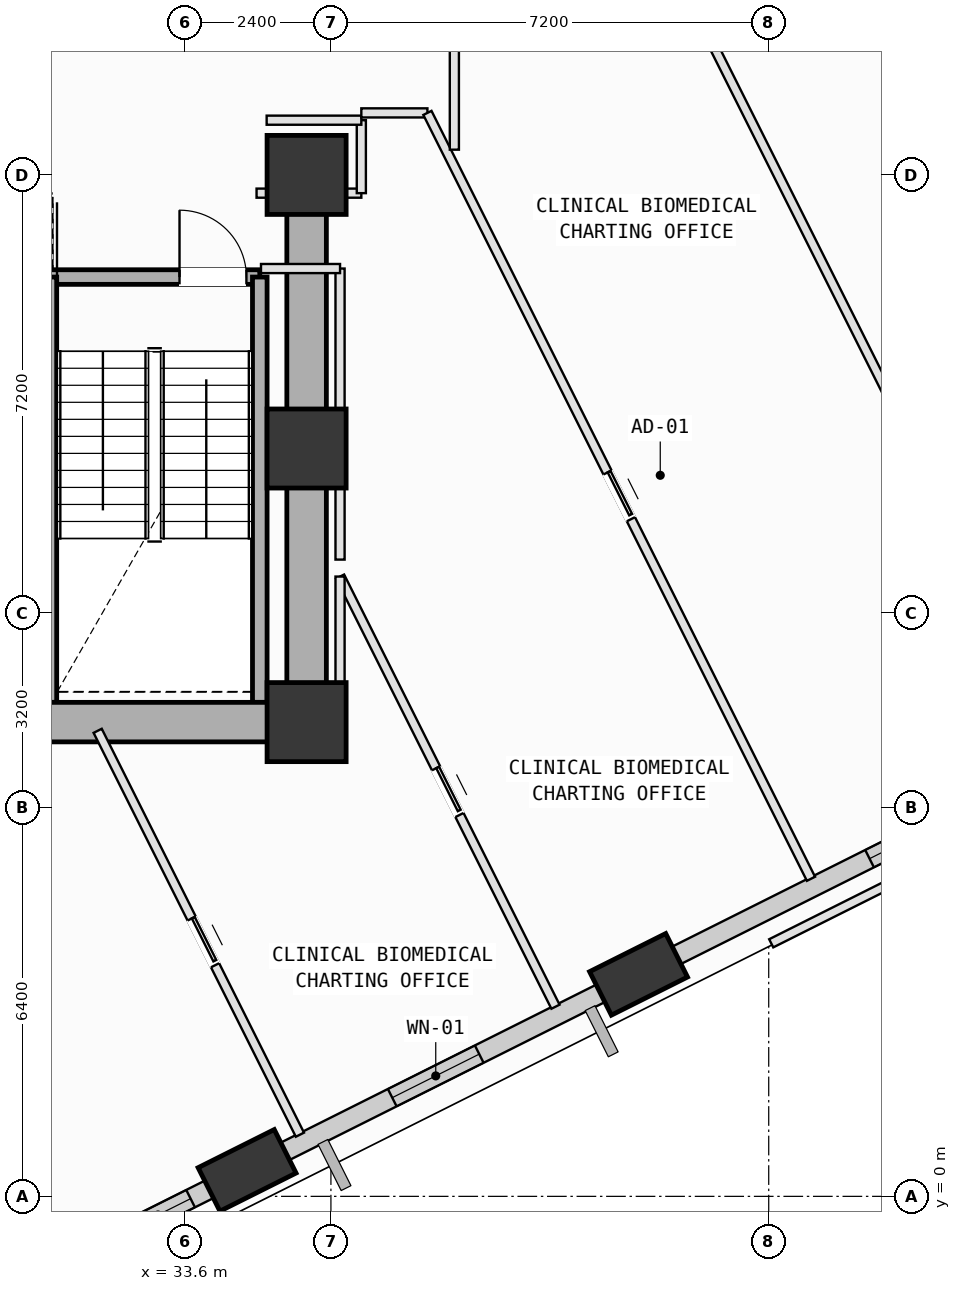
"""IFC4 building model, lengths in metres.
Left out: names, types, materials, properties, quantities, classifications, styles, units other than length and angle.
Written with IfcOpenShell. Run it as: python <this file> out.ifc"""

import sys

from ifc_helpers import new_model, si_unit, direction, frame, frame_2d, origin, origin_2d, place, context, subcontext, project, spatial, rectangle, extrude, element, fill, save


model = new_model("IFC4")
c1 = context("Model", 3, precision=1e-05, world=origin(), true_north=direction((0.0, 1.0)))
c2 = subcontext(c1, "Body", "Model", "MODEL_VIEW")
j1 = project(units=[si_unit("LENGTHUNIT", "METRE"), si_unit("PLANEANGLEUNIT", "RADIAN")], contexts=[c1])
p1 = place(None, origin())
s1 = spatial("IfcSite", under=j1, at=p1, CompositionType="ELEMENT")
p2 = place(p1, origin())
s2 = spatial("IfcBuilding", under=s1, at=p2, CompositionType="ELEMENT")
p3 = place(p2, frame((0.0, 0.0, 136.4)))
s3 = spatial("IfcBuildingStorey", under=s2, at=p3, CompositionType="ELEMENT", Elevation=136.4)
for number, where, z_axis, x_axis in (
    (1, (35.6, 7.8, 0.0), (0.0, 0.0, 1.0), (1.0, 0.0, 0.0)),
    (2, (35.6, 12.3, 0.0), (0.0, 0.0, 1.0), (1.0, 0.0, 0.0)),
    (3, (35.6, 16.8, 0.0), (0.0, 0.0, 1.0), (1.0, 0.0, 0.0)),
):
    element("IfcColumn", number, at=place(p3, frame(where, z_axis=z_axis, x_axis=x_axis)), inside=s3, PredefinedType="COLUMN", context=c2, shape_type="SweptSolid", body=[
        extrude(rectangle(XDim=1.3, YDim=1.3, at=origin_2d()), origin(), (0.0, 0.0, 1.0), 4.0),
    ])
p4 = place(p3, frame((34.621, 0.427, 0.002), z_axis=(0.100471293785, 0.005044838103, 0.994927167552), x_axis=(-0.489767700686, 0.870688619745, 0.045043610104)))
e4 = element("IfcColumn", 4, at=p4, inside=s3, PredefinedType="COLUMN", context=c2, shape_type="SweptSolid", body=[
    extrude(rectangle(XDim=1.4, YDim=0.8, at=origin_2d()), origin(), (0.0, 0.0, 1.0), 4.017),
])
p5 = place(p3, frame((41.059, 3.651, 0.002), z_axis=(0.087045946082, 0.031509294249, 0.995705864021), x_axis=(-0.7235601559, 0.68901563881, 0.041450576223)))
e5 = element("IfcColumn", 5, at=p5, inside=s3, PredefinedType="COLUMN", context=c2, shape_type="SweptSolid", body=[
    extrude(rectangle(XDim=1.4, YDim=0.8, at=origin_2d()), origin(), (0.0, 0.0, 1.0), 4.014),
])
p6 = place(p3, frame((34.349, 0.291, 0.0), z_axis=(0.0, 0.0, 1.0), x_axis=(-0.89414504737, -0.447777438316, 0.0)))
e6 = element("IfcWall", 6, at=p6, inside=s3, PredefinedType="SOLIDWALL", context=c2, shape_type="SweptSolid", body=[
    extrude(rectangle(XDim=6.234, YDim=0.32, at=frame_2d((3.117, 0.0))), origin(), (0.0, 0.0, 1.0), 3.165),
])
p7 = place(p6, frame((0.734, 0.0, 0.75)))
e7 = element("IfcOpeningElement", 7, at=p7, cuts=e6, PredefinedType="OPENING", context=c2, shape_type="SweptSolid", body=[
    extrude(rectangle(XDim=1.2, YDim=1.75, at=frame_2d((0.6, 0.875))), frame((0.0, 0.17, 0.0), z_axis=(0.0, -1.0, 0.0), x_axis=(1.0, 0.0, 0.0)), (0.0, 0.0, 1.0), 0.34),
])
p8 = place(p3, frame((40.781, 3.512, 0.0), z_axis=(0.0, 0.0, 1.0), x_axis=(-0.894152006982, -0.447763540734, 0.0)))
e8 = element("IfcWall", 8, at=p8, inside=s3, PredefinedType="SOLIDWALL", context=c2, shape_type="SweptSolid", body=[
    extrude(rectangle(XDim=6.214, YDim=0.32, at=frame_2d((3.107, 0.0))), origin(), (0.0, 0.0, 1.0), 3.165),
])
p9 = place(p8, frame((2.619, 0.0, 0.75)))
e9 = element("IfcOpeningElement", 9, at=p9, cuts=e8, PredefinedType="OPENING", context=c2, shape_type="SweptSolid", body=[
    extrude(rectangle(XDim=1.6, YDim=1.95, at=frame_2d((0.8, 0.975))), frame((0.0, 0.17, 0.0), z_axis=(0.0, -1.0, 0.0), x_axis=(1.0, 0.0, 0.0)), (0.0, 0.0, 1.0), 0.34),
])
p10 = place(p3, frame((47.219, 6.736, 0.0), z_axis=(0.0, 0.0, 1.0), x_axis=(-0.894159648303, -0.447748281232, 0.0)))
e10 = element("IfcWall", 10, at=p10, inside=s3, PredefinedType="SOLIDWALL", context=c2, shape_type="SweptSolid", body=[
    extrude(rectangle(XDim=6.209, YDim=0.32, at=frame_2d((3.104, 0.0))), origin(), (0.0, 0.0, 1.0), 3.165),
])
p11 = place(p10, frame((0.64, 0.0, 0.75)))
e11 = element("IfcOpeningElement", 11, at=p11, cuts=e10, PredefinedType="OPENING", context=c2, shape_type="SweptSolid", body=[
    extrude(rectangle(XDim=2.0, YDim=1.95, at=frame_2d((1.0, 0.975))), frame((0.0, 0.17, 0.0), z_axis=(0.0, -1.0, 0.0), x_axis=(1.0, 0.0, 0.0)), (0.0, 0.0, 1.0), 0.34),
])
p12 = place(p3, frame((31.37, 15.12, 0.0), z_axis=(0.0, 0.0, 1.0), x_axis=(1.0, 0.0, 0.0)))
e12 = element("IfcWall", 12, at=p12, inside=s3, PredefinedType="SOLIDWALL", context=c2, shape_type="SweptSolid", body=[
    extrude(rectangle(XDim=3.46, YDim=0.24, at=frame_2d((1.73, 0.0))), origin(), (0.0, 0.0, 1.0), 3.78),
])
p13 = place(p12, frame((2.14, 0.0, 0.0)))
e13 = element("IfcOpeningElement", 13, at=p13, cuts=e12, PredefinedType="OPENING", context=c2, shape_type="SweptSolid", body=[
    extrude(rectangle(XDim=1.1, YDim=2.15, at=frame_2d((0.55, 1.075))), frame((0.0, 0.13, 0.0), z_axis=(0.0, -1.0, 0.0), x_axis=(1.0, 0.0, 0.0)), (0.0, 0.0, 1.0), 0.26),
])
for number, where, z_axis, x_axis in (
    (14, (34.83, 15.12, 0.0), (0.0, 0.0, 1.0), (0.0, -1.0, 0.0)),
    (15, (31.37, 8.125, 0.0), (0.0, 0.0, 1.0), (0.0, 1.0, 0.0)),
):
    element("IfcWall", number, at=place(p3, frame(where, z_axis=z_axis, x_axis=x_axis)), inside=s3, PredefinedType="SOLIDWALL", context=c2, shape_type="SweptSolid", body=[
        extrude(rectangle(XDim=6.995, YDim=0.24, at=frame_2d((3.498, 0.0))), origin(), (0.0, 0.0, 1.0), 3.78),
    ])
p14 = place(p3, frame((24.8, 7.8, 0.0), z_axis=(0.0, 0.0, 1.0), x_axis=(1.0, 0.0, 0.0)))
e16 = element("IfcWall", 16, at=p14, inside=s3, PredefinedType="SHEAR", context=c2, shape_type="SweptSolid", body=[
    extrude(rectangle(XDim=10.8, YDim=0.65, at=frame_2d((5.4, 0.0))), origin(), (0.0, 0.0, 1.0), 3.78),
])
p15 = place(p3, frame((35.6, 7.8, 0.0), z_axis=(0.0, 0.0, 1.0), x_axis=(0.0, 1.0, 0.0)))
e17 = element("IfcWall", 17, at=p15, inside=s3, PredefinedType="SHEAR", context=c2, shape_type="SweptSolid", body=[
    extrude(rectangle(XDim=9.0, YDim=0.65, at=frame_2d((4.5, 0.0))), origin(), (0.0, 0.0, 1.0), 3.78),
])
p16 = place(p3, frame((35.327, 0.524, 0.0), z_axis=(0.0, 0.0, 1.0), x_axis=(-0.893827844482, -0.44841028582, 0.0)))
e18 = element("IfcWall", 18, at=p16, inside=s3, PredefinedType="PARTITIONING", context=c2, shape_type="SweptSolid", body=[
    extrude(rectangle(XDim=0.979, YDim=0.15, at=frame_2d((0.49, 0.0))), origin(), (0.0, 0.0, 1.0), 3.165),
])
p17 = place(p3, frame((32.164, 7.657, 0.0), z_axis=(0.0, 0.0, 1.0), x_axis=(0.447686753876, -0.89419045533, 0.0)))
e19 = element("IfcWall", 19, at=p17, inside=s3, PredefinedType="PARTITIONING", context=c2, shape_type="SweptSolid", body=[
    extrude(rectangle(XDim=7.429, YDim=0.15, at=frame_2d((3.715, 0.0))), origin(), (0.0, 0.0, 1.0), 3.78),
])
p18 = place(p17, frame((3.452, 0.0, 0.0)))
e20 = element("IfcOpeningElement", 20, at=p18, cuts=e19, PredefinedType="OPENING", context=c2, shape_type="SweptSolid", body=[
    extrude(rectangle(XDim=0.86, YDim=2.06, at=frame_2d((0.43, 1.03))), frame((0.0, 0.085, 0.0), z_axis=(0.0, -1.0, 0.0), x_axis=(1.0, 0.0, 0.0)), (0.0, 0.0, 1.0), 0.17),
])
p19 = place(p3, frame((36.15, 10.194, 0.0), z_axis=(0.0, 0.0, 1.0), x_axis=(0.447781215356, -0.894143155862, 0.0)))
e21 = element("IfcWall", 21, at=p19, inside=s3, PredefinedType="PARTITIONING", context=c2, shape_type="SweptSolid", body=[
    extrude(rectangle(XDim=7.913, YDim=0.15, at=frame_2d((3.957, 0.0))), origin(), (0.0, 0.0, 1.0), 3.78),
])
p20 = place(p19, frame((3.526, 0.0, 0.0)))
e22 = element("IfcOpeningElement", 22, at=p20, cuts=e21, PredefinedType="OPENING", context=c2, shape_type="SweptSolid", body=[
    extrude(rectangle(XDim=0.86, YDim=2.06, at=frame_2d((0.43, 1.03))), frame((0.0, 0.085, 0.0), z_axis=(0.0, -1.0, 0.0), x_axis=(1.0, 0.0, 0.0)), (0.0, 0.0, 1.0), 0.17),
])
p21 = place(p3, frame((35.6, 7.5, 0.0), z_axis=(0.0, 0.0, 1.0), x_axis=(1.0, 0.0, 0.0)))
e23 = element("IfcWall", 23, at=p21, inside=s3, PredefinedType="PARTITIONING", context=c2, shape_type="SweptSolid", body=[
    extrude(rectangle(XDim=0.55, YDim=0.15, at=frame_2d((0.275, 0.0))), origin(), (0.0, 0.0, 1.0), 2.965),
])
p22 = place(p3, frame((36.15, 7.5, 0.0), z_axis=(0.0, 0.0, 1.0), x_axis=(0.0, 1.0, 0.0)))
e24 = element("IfcWall", 24, at=p22, inside=s3, PredefinedType="PARTITIONING", context=c2, shape_type="SweptSolid", body=[
    extrude(rectangle(XDim=2.694, YDim=0.15, at=frame_2d((1.347, 0.0))), origin(), (0.0, 0.0, 1.0), 3.78),
])
p23 = place(p3, frame((34.777, 16.5, 0.0), z_axis=(0.0, 0.0, 1.0), x_axis=(1.0, 0.0, 0.0)))
e25 = element("IfcWall", 25, at=p23, inside=s3, PredefinedType="PARTITIONING", context=c2, shape_type="SweptSolid", body=[
    extrude(rectangle(XDim=1.723, YDim=0.15, at=frame_2d((0.861, 0.0))), origin(), (0.0, 0.0, 1.0), 2.965),
])
p24 = place(p3, frame((36.5, 16.5, 0.0), z_axis=(0.0, 0.0, 1.0), x_axis=(0.0, 1.0, 0.0)))
e26 = element("IfcWall", 26, at=p24, inside=s3, PredefinedType="PARTITIONING", context=c2, shape_type="SweptSolid", body=[
    extrude(rectangle(XDim=1.2, YDim=0.15, at=frame_2d((0.6, 0.0))), origin(), (0.0, 0.0, 1.0), 3.78),
])
p25 = place(p3, frame((36.5, 17.7, 0.0), z_axis=(0.0, 0.0, 1.0), x_axis=(-1.0, 0.0, 0.0)))
e27 = element("IfcWall", 27, at=p25, inside=s3, PredefinedType="PARTITIONING", context=c2, shape_type="SweptSolid", body=[
    extrude(rectangle(XDim=1.557, YDim=0.15, at=frame_2d((0.778, 0.0))), origin(), (0.0, 0.0, 1.0), 3.78),
])
p26 = place(p3, frame((36.5, 17.82, 0.0), z_axis=(0.0, 0.0, 1.0), x_axis=(1.0, 0.0, 0.0)))
e28 = element("IfcWall", 28, at=p26, inside=s3, PredefinedType="PARTITIONING", context=c2, shape_type="SweptSolid", body=[
    extrude(rectangle(XDim=1.087, YDim=0.15, at=frame_2d((0.543, 0.0))), origin(), (0.0, 0.0, 1.0), 2.965),
])
p27 = place(p3, frame((37.587, 17.82, 0.0), z_axis=(0.0, 0.0, 1.0), x_axis=(0.447754187631, -0.894156690664, 0.0)))
e29 = element("IfcWall", 29, at=p27, inside=s3, PredefinedType="PARTITIONING", context=c2, shape_type="SweptSolid", body=[
    extrude(rectangle(XDim=14.088, YDim=0.15, at=frame_2d((7.044, 0.0))), origin(), (0.0, 0.0, 1.0), 3.78),
])
p28 = place(p27, frame((6.614, 0.0, 0.0)))
e30 = element("IfcOpeningElement", 30, at=p28, cuts=e29, PredefinedType="OPENING", context=c2, shape_type="SweptSolid", body=[
    extrude(rectangle(XDim=0.86, YDim=2.06, at=frame_2d((0.43, 1.03))), frame((0.0, 0.085, 0.0), z_axis=(0.0, -1.0, 0.0), x_axis=(1.0, 0.0, 0.0)), (0.0, 0.0, 1.0), 0.17),
])
p29 = place(p3, frame((41.77, 3.75, 0.0), z_axis=(0.0, 0.0, 1.0), x_axis=(-0.893983331668, -0.448100215019, 0.0)))
e31 = element("IfcWall", 31, at=p29, inside=s3, PredefinedType="PARTITIONING", context=c2, shape_type="SweptSolid", body=[
    extrude(rectangle(XDim=0.991, YDim=0.15, at=frame_2d((0.496, 0.0))), origin(), (0.0, 0.0, 1.0), 3.165),
])
p30 = place(p3, frame((36.15, 10.473, 0.0), z_axis=(0.0, 0.0, 1.0), x_axis=(0.0, 1.0, 0.0)))
e32 = element("IfcWall", 32, at=p30, inside=s3, PredefinedType="PARTITIONING", context=c2, shape_type="SweptSolid", body=[
    extrude(rectangle(XDim=4.787, YDim=0.15, at=frame_2d((2.394, 0.0))), origin(), (0.0, 0.0, 1.0), 3.78),
])
p31 = place(p3, frame((36.15, 15.26, 0.0), z_axis=(0.0, 0.0, 1.0), x_axis=(-1.0, 0.0, 0.0)))
e33 = element("IfcWall", 33, at=p31, inside=s3, PredefinedType="PARTITIONING", context=c2, shape_type="SweptSolid", body=[
    extrude(rectangle(XDim=1.3, YDim=0.15, at=frame_2d((0.65, 0.0))), origin(), (0.0, 0.0, 1.0), 3.78),
])
p32 = place(p3, frame((38.03, 17.215, 0.0), z_axis=(0.0, 0.0, 1.0), x_axis=(0.0, 1.0, 0.0)))
e34 = element("IfcWall", 34, at=p32, inside=s3, PredefinedType="PARTITIONING", context=c2, shape_type="SweptSolid", body=[
    extrude(rectangle(XDim=2.031, YDim=0.15, at=frame_2d((1.016, 0.0))), origin(), (0.0, 0.0, 1.0), 3.78),
])
p33 = place(p3, frame((41.308, 20.887, 0.0), z_axis=(0.0, 0.0, 1.0), x_axis=(0.447793043956, -0.894137232076, 0.0)))
e35 = element("IfcWall", 35, at=p33, inside=s3, PredefinedType="PARTITIONING", context=c2, shape_type="SweptSolid", body=[
    extrude(rectangle(XDim=15.166, YDim=0.15, at=frame_2d((7.583, 0.0))), origin(), (0.0, 0.0, 1.0), 3.78),
])
p34 = place(p3, frame((48.776, 6.934, 0.0), z_axis=(0.0, 0.0, 1.0), x_axis=(-0.894135147504, -0.447797206332, 0.0)))
e36 = element("IfcWall", 36, at=p34, inside=s3, PredefinedType="PARTITIONING", context=c2, shape_type="SweptSolid", body=[
    extrude(rectangle(XDim=6.19, YDim=0.15, at=frame_2d((3.095, 0.0))), origin(), (0.0, 0.0, 1.0), 3.78),
])
p35 = place(p7, origin())
e37 = element("IfcWindow", 37, at=p35, inside=s3, PartitioningType="SINGLE_PANEL", PredefinedType="WINDOW", context=c2, shape_type="SweptSolid", body=[
    extrude(rectangle(XDim=1.2, YDim=1.75, at=frame_2d((0.6, 0.875))), frame((0.0, 0.03, 0.0), z_axis=(0.0, -1.0, 0.0), x_axis=(1.0, 0.0, 0.0)), (0.0, 0.0, 1.0), 0.06),
])
fill(e7, e37)
p36 = place(p9, origin())
e38 = element("IfcWindow", 38, at=p36, inside=s3, PartitioningType="SINGLE_PANEL", PredefinedType="WINDOW", context=c2, shape_type="SweptSolid", body=[
    extrude(rectangle(XDim=1.6, YDim=1.95, at=frame_2d((0.8, 0.975))), frame((0.0, 0.03, 0.0), z_axis=(0.0, -1.0, 0.0), x_axis=(1.0, 0.0, 0.0)), (0.0, 0.0, 1.0), 0.06),
])
fill(e9, e38)
p37 = place(p11, origin())
e39 = element("IfcWindow", 39, at=p37, inside=s3, PartitioningType="SINGLE_PANEL", PredefinedType="WINDOW", context=c2, shape_type="SweptSolid", body=[
    extrude(rectangle(XDim=2.0, YDim=1.95, at=frame_2d((1.0, 0.975))), frame((0.0, 0.03, 0.0), z_axis=(0.0, -1.0, 0.0), x_axis=(1.0, 0.0, 0.0)), (0.0, 0.0, 1.0), 0.06),
])
fill(e11, e39)
p38 = place(p13, origin())
e40 = element("IfcDoor", 40, at=p38, inside=s3, OperationType="SINGLE_SWING_LEFT", PredefinedType="DOOR", context=c2, shape_type="SweptSolid", body=[
    extrude(rectangle(XDim=1.1, YDim=2.15, at=frame_2d((0.55, 1.075))), frame((0.0, 0.025, 0.0), z_axis=(0.0, -1.0, 0.0), x_axis=(1.0, 0.0, 0.0)), (0.0, 0.0, 1.0), 0.05),
])
fill(e13, e40)
p39 = place(p28, origin())
e41 = element("IfcDoor", 41, at=p39, inside=s3, OperationType="SLIDING_TO_LEFT", PredefinedType="DOOR", context=c2, shape_type="SweptSolid", body=[
    extrude(rectangle(XDim=0.86, YDim=2.06, at=frame_2d((0.43, 1.03))), frame((0.0, 0.025, 0.0), z_axis=(0.0, -1.0, 0.0), x_axis=(1.0, 0.0, 0.0)), (0.0, 0.0, 1.0), 0.05),
])
fill(e30, e41)
p40 = place(p20, origin())
e42 = element("IfcDoor", 42, at=p40, inside=s3, OperationType="SLIDING_TO_LEFT", PredefinedType="DOOR", context=c2, shape_type="SweptSolid", body=[
    extrude(rectangle(XDim=0.86, YDim=2.06, at=frame_2d((0.43, 1.03))), frame((0.0, 0.025, 0.0), z_axis=(0.0, -1.0, 0.0), x_axis=(1.0, 0.0, 0.0)), (0.0, 0.0, 1.0), 0.05),
])
fill(e22, e42)
p41 = place(p18, origin())
e43 = element("IfcDoor", 43, at=p41, inside=s3, OperationType="SLIDING_TO_LEFT", PredefinedType="DOOR", context=c2, shape_type="SweptSolid", body=[
    extrude(rectangle(XDim=0.86, YDim=2.06, at=frame_2d((0.43, 1.03))), frame((0.0, 0.025, 0.0), z_axis=(0.0, -1.0, 0.0), x_axis=(1.0, 0.0, 0.0)), (0.0, 0.0, 1.0), 0.05),
])
fill(e20, e43)
save(model, sys.argv[1])
